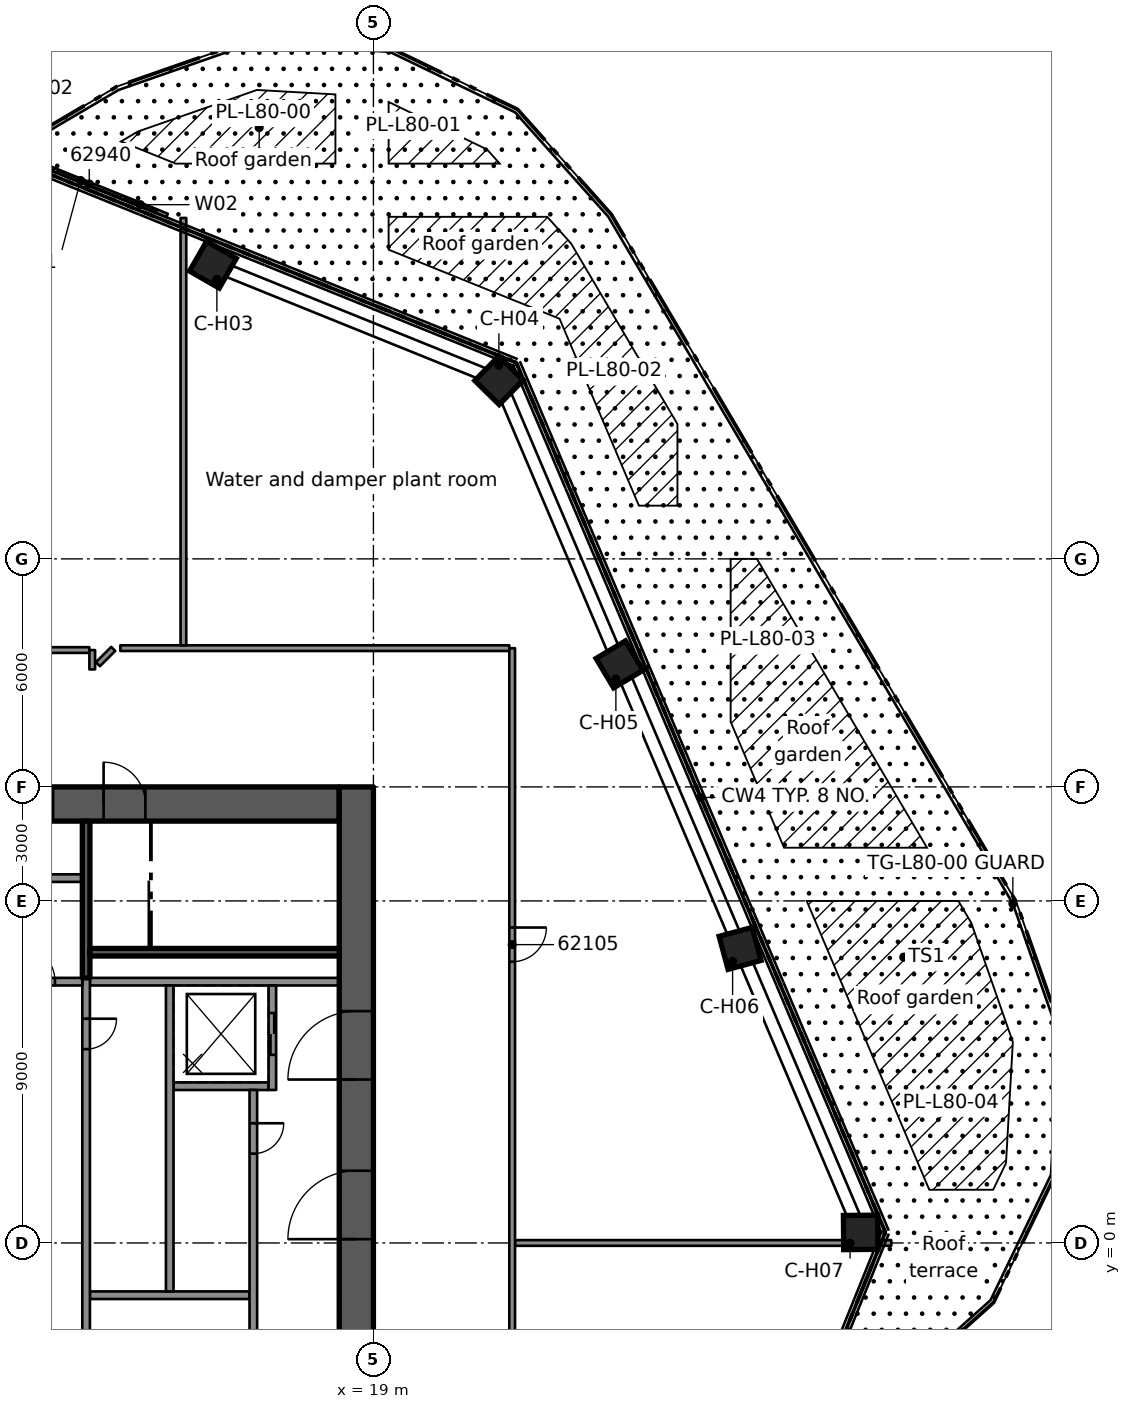
"""IFC4 building model, lengths in metres.
Left out: names, types, materials, properties, quantities, classifications, styles, units other than length and angle.
Written with IfcOpenShell. Run it as: python <this file> out.ifc"""

import sys

from ifc_helpers import new_model, si_unit, direction, frame, frame_2d, origin, origin_2d, place, context, subcontext, project, spatial, rectangle, extrude, element, fill, save


model = new_model("IFC4")
c1 = context("Model", 3, precision=1e-05, world=origin(), true_north=direction((0.0, 1.0)))
c2 = subcontext(c1, "Body", "Model", "MODEL_VIEW")
j1 = project(units=[si_unit("LENGTHUNIT", "METRE"), si_unit("PLANEANGLEUNIT", "RADIAN")], contexts=[c1])
p1 = place(None, origin())
s1 = spatial("IfcSite", under=j1, at=p1, CompositionType="ELEMENT")
p2 = place(p1, origin())
s2 = spatial("IfcBuilding", under=s1, at=p2, CompositionType="ELEMENT")
p3 = place(p2, frame((0.0, 0.0, 299.9)))
s3 = spatial("IfcBuildingStorey", under=s2, at=p3, CompositionType="ELEMENT", Elevation=299.9)
p4 = place(p3, frame((8.9, 11.55, 0.0), z_axis=(0.0, 0.0, 1.0), x_axis=(1.0, 0.0, 0.0)))
e1 = element("IfcWall", 1, at=p4, inside=s3, PredefinedType="SHEAR", context=c2, shape_type="SweptSolid", body=[
    extrude(rectangle(XDim=9.2, YDim=0.9, at=frame_2d((4.6, 0.0))), origin(), (0.0, 0.0, 1.0), 4.4),
])
p5 = place(p4, frame((3.0, 0.0, 0.0)))
e2 = element("IfcOpeningElement", 2, at=p5, cuts=e1, PredefinedType="OPENING", context=c2, shape_type="SweptSolid", body=[
    extrude(rectangle(XDim=1.1, YDim=2.1, at=frame_2d((0.55, 1.05))), frame((0.0, 0.46, 0.0), z_axis=(0.0, -1.0, 0.0), x_axis=(1.0, 0.0, 0.0)), (0.0, 0.0, 1.0), 0.92),
])
p6 = place(p4, frame((0.77, 0.0, 0.0)))
e3 = element("IfcOpeningElement", 3, at=p6, cuts=e1, PredefinedType="OPENING", context=c2, shape_type="SweptSolid", body=[
    extrude(rectangle(XDim=0.9, YDim=2.1, at=frame_2d((0.45, 1.05))), frame((0.0, 0.46, 0.0), z_axis=(0.0, -1.0, 0.0), x_axis=(1.0, 0.0, 0.0)), (0.0, 0.0, 1.0), 0.92),
])
p7 = place(p3, frame((18.55, -12.0, 0.0), z_axis=(0.0, 0.0, 1.0), x_axis=(0.0, 1.0, 0.0)))
e4 = element("IfcWall", 4, at=p7, inside=s3, PredefinedType="SHEAR", context=c2, shape_type="SweptSolid", body=[
    extrude(rectangle(XDim=24.0, YDim=0.9, at=frame_2d((12.0, 0.0))), origin(), (0.0, 0.0, 1.0), 4.4),
])
p8 = place(p7, frame((16.3, 0.0, 0.0)))
e5 = element("IfcOpeningElement", 5, at=p8, cuts=e4, PredefinedType="OPENING", context=c2, shape_type="SweptSolid", body=[
    extrude(rectangle(XDim=1.8, YDim=2.1, at=frame_2d((0.9, 1.05))), frame((0.0, 0.46, 0.0), z_axis=(0.0, -1.0, 0.0), x_axis=(1.0, 0.0, 0.0)), (0.0, 0.0, 1.0), 0.92),
])
p9 = place(p7, frame((12.1, 0.0, 0.0)))
e6 = element("IfcOpeningElement", 6, at=p9, cuts=e4, PredefinedType="OPENING", context=c2, shape_type="SweptSolid", body=[
    extrude(rectangle(XDim=1.8, YDim=2.1, at=frame_2d((0.9, 1.05))), frame((0.0, 0.46, 0.0), z_axis=(0.0, -1.0, 0.0), x_axis=(1.0, 0.0, 0.0)), (0.0, 0.0, 1.0), 0.92),
])
p10 = place(p7, frame((7.9, 0.0, 0.0)))
e7 = element("IfcOpeningElement", 7, at=p10, cuts=e4, PredefinedType="OPENING", context=c2, shape_type="SweptSolid", body=[
    extrude(rectangle(XDim=1.8, YDim=2.1, at=frame_2d((0.9, 1.05))), frame((0.0, 0.46, 0.0), z_axis=(0.0, -1.0, 0.0), x_axis=(1.0, 0.0, 0.0)), (0.0, 0.0, 1.0), 0.92),
])
for number, where, z_axis, x_axis in (
    (8, (14.777, 25.739, 0.0), (0.0, 0.0, 1.0), (0.498, 0.867, 0.0)),
    (9, (22.305, 22.697, 0.0), (0.0, 0.0, 1.0), (0.701, 0.713, 0.0)),
    (10, (25.477, 15.224, 0.0), (0.0, 0.0, 1.0), (0.858, 0.513, 0.0)),
    (11, (28.649, 7.751, 0.0), (0.0, 0.0, 1.0), (0.965, 0.261, 0.0)),
    (12, (31.821, 0.278, 0.0), (0.0, 0.0, 1.0), (1.0, 0.009, 0.0)),
):
    element("IfcColumn", number, at=place(p3, frame(where, z_axis=z_axis, x_axis=x_axis)), inside=s3, PredefinedType="COLUMN", context=c2, shape_type="SweptSolid", body=[
        extrude(rectangle(XDim=0.9, YDim=0.9, at=origin_2d()), origin(), (0.0, 0.0, 1.0), 4.4),
    ])
p11 = place(p3, frame((11.54, 6.875, 0.0), z_axis=(0.0, 0.0, 1.0), x_axis=(1.0, 0.0, 0.0)))
e13 = element("IfcWall", 13, at=p11, inside=s3, PredefinedType="SOLIDWALL", context=c2, shape_type="SweptSolid", body=[
    extrude(rectangle(XDim=6.56, YDim=0.2, at=frame_2d((3.28, 0.0))), origin(), (0.0, 0.0, 1.0), 3.98),
])
p12 = place(p3, frame((13.74, 4.125, 0.0), z_axis=(0.0, 0.0, 1.0), x_axis=(1.0, 0.0, 0.0)))
e14 = element("IfcWall", 14, at=p12, inside=s3, PredefinedType="SOLIDWALL", context=c2, shape_type="SweptSolid", body=[
    extrude(rectangle(XDim=2.5, YDim=0.2, at=frame_2d((1.25, 0.0))), origin(), (0.0, 0.0, 1.0), 3.98),
])
p13 = place(p3, frame((11.54, -1.375, 0.0), z_axis=(0.0, 0.0, 1.0), x_axis=(1.0, 0.0, 0.0)))
e15 = element("IfcWall", 15, at=p13, inside=s3, PredefinedType="SOLIDWALL", context=c2, shape_type="SweptSolid", body=[
    extrude(rectangle(XDim=4.2, YDim=0.2, at=frame_2d((2.1, 0.0))), origin(), (0.0, 0.0, 1.0), 3.98),
])
p14 = place(p3, frame((11.44, 6.975, 0.0), z_axis=(0.0, 0.0, 1.0), x_axis=(0.0, -1.0, 0.0)))
e16 = element("IfcWall", 16, at=p14, inside=s3, PredefinedType="SOLIDWALL", context=c2, shape_type="SweptSolid", body=[
    extrude(rectangle(XDim=13.95, YDim=0.2, at=frame_2d((6.975, 0.0))), origin(), (0.0, 0.0, 1.0), 3.98),
])
p15 = place(p14, frame((11.925, 0.0, 0.0)))
e17 = element("IfcOpeningElement", 17, at=p15, cuts=e16, PredefinedType="OPENING", context=c2, shape_type="SweptSolid", body=[
    extrude(rectangle(XDim=1.1, YDim=2.1, at=frame_2d((0.55, 1.05))), frame((0.0, 0.11, 0.0), z_axis=(0.0, -1.0, 0.0), x_axis=(1.0, 0.0, 0.0)), (0.0, 0.0, 1.0), 0.22),
])
p16 = place(p14, frame((1.075, 0.0, 0.0)))
e18 = element("IfcOpeningElement", 18, at=p16, cuts=e16, PredefinedType="OPENING", context=c2, shape_type="SweptSolid", body=[
    extrude(rectangle(XDim=0.8, YDim=2.1, at=frame_2d((0.4, 1.05))), frame((0.0, 0.11, 0.0), z_axis=(0.0, -1.0, 0.0), x_axis=(1.0, 0.0, 0.0)), (0.0, 0.0, 1.0), 0.22),
])
p17 = place(p14, frame((9.325, 0.0, 0.0)))
e19 = element("IfcOpeningElement", 19, at=p17, cuts=e16, PredefinedType="OPENING", context=c2, shape_type="SweptSolid", body=[
    extrude(rectangle(XDim=0.8, YDim=2.1, at=frame_2d((0.4, 1.05))), frame((0.0, 0.11, 0.0), z_axis=(0.0, -1.0, 0.0), x_axis=(1.0, 0.0, 0.0)), (0.0, 0.0, 1.0), 0.22),
])
p18 = place(p3, frame((13.64, 6.775, 0.0), z_axis=(0.0, 0.0, 1.0), x_axis=(0.0, -1.0, 0.0)))
e20 = element("IfcWall", 20, at=p18, inside=s3, PredefinedType="SOLIDWALL", context=c2, shape_type="SweptSolid", body=[
    extrude(rectangle(XDim=8.05, YDim=0.2, at=frame_2d((4.025, 0.0))), origin(), (0.0, 0.0, 1.0), 3.98),
])
p19 = place(p3, frame((16.34, 6.775, 0.0), z_axis=(0.0, 0.0, 1.0), x_axis=(0.0, -1.0, 0.0)))
e21 = element("IfcWall", 21, at=p19, inside=s3, PredefinedType="SOLIDWALL", context=c2, shape_type="SweptSolid", body=[
    extrude(rectangle(XDim=2.75, YDim=0.2, at=frame_2d((1.375, 0.0))), origin(), (0.0, 0.0, 1.0), 3.98),
])
p20 = place(p19, frame((0.725, 0.0, 0.0)))
e22 = element("IfcOpeningElement", 22, at=p20, cuts=e21, PredefinedType="OPENING", context=c2, shape_type="SweptSolid", body=[
    extrude(rectangle(XDim=1.1, YDim=2.1, at=frame_2d((0.55, 1.05))), frame((0.0, 0.11, 0.0), z_axis=(0.0, -1.0, 0.0), x_axis=(1.0, 0.0, 0.0)), (0.0, 0.0, 1.0), 0.22),
])
p21 = place(p3, frame((15.84, 4.025, 0.0), z_axis=(0.0, 0.0, 1.0), x_axis=(0.0, -1.0, 0.0)))
e23 = element("IfcWall", 23, at=p21, inside=s3, PredefinedType="SOLIDWALL", context=c2, shape_type="SweptSolid", body=[
    extrude(rectangle(XDim=8.25, YDim=0.2, at=frame_2d((4.125, 0.0))), origin(), (0.0, 0.0, 1.0), 3.98),
])
p22 = place(p21, frame((0.875, 0.0, 0.0)))
e24 = element("IfcOpeningElement", 24, at=p22, cuts=e23, PredefinedType="OPENING", context=c2, shape_type="SweptSolid", body=[
    extrude(rectangle(XDim=0.8, YDim=2.1, at=frame_2d((0.4, 1.05))), frame((0.0, 0.11, 0.0), z_axis=(0.0, -1.0, 0.0), x_axis=(1.0, 0.0, 0.0)), (0.0, 0.0, 1.0), 0.22),
])
p23 = place(p3, frame((11.44, 11.1, 0.0), z_axis=(0.0, 0.0, 1.0), x_axis=(0.0, -1.0, 0.0)))
e25 = element("IfcWall", 25, at=p23, inside=s3, PredefinedType="SOLIDWALL", context=c2, shape_type="SweptSolid", body=[
    extrude(rectangle(XDim=4.125, YDim=0.2, at=frame_2d((2.062, 0.0))), origin(), (0.0, 0.0, 1.0), 3.98),
])
p24 = place(p3, frame((11.54, 7.65, 0.0), z_axis=(0.0, 0.0, 1.0), x_axis=(1.0, 0.0, 0.0)))
e26 = element("IfcWall", 26, at=p24, inside=s3, PredefinedType="SOLIDWALL", context=c2, shape_type="SweptSolid", body=[
    extrude(rectangle(XDim=6.56, YDim=0.2, at=frame_2d((3.28, 0.0))), origin(), (0.0, 0.0, 1.0), 3.98),
])
p25 = place(p3, frame((8.9, 6.875, 0.0), z_axis=(0.0, 0.0, 1.0), x_axis=(1.0, 0.0, 0.0)))
e27 = element("IfcWall", 27, at=p25, inside=s3, PredefinedType="PARTITIONING", context=c2, shape_type="SweptSolid", body=[
    extrude(rectangle(XDim=2.44, YDim=0.2, at=frame_2d((1.22, 0.0))), origin(), (0.0, 0.0, 1.0), 3.98),
])
p26 = place(p25, frame((0.72, 0.0, 0.0)))
e28 = element("IfcOpeningElement", 28, at=p26, cuts=e27, PredefinedType="OPENING", context=c2, shape_type="SweptSolid", body=[
    extrude(rectangle(XDim=1.0, YDim=2.1, at=frame_2d((0.5, 1.05))), frame((0.0, 0.11, 0.0), z_axis=(0.0, -1.0, 0.0), x_axis=(1.0, 0.0, 0.0)), (0.0, 0.0, 1.0), 0.22),
])
p27 = place(p3, frame((8.9, 9.6, 0.0), z_axis=(0.0, 0.0, 1.0), x_axis=(1.0, 0.0, 0.0)))
e29 = element("IfcWall", 29, at=p27, inside=s3, PredefinedType="PARTITIONING", context=c2, shape_type="SweptSolid", body=[
    extrude(rectangle(XDim=2.44, YDim=0.2, at=frame_2d((1.22, 0.0))), origin(), (0.0, 0.0, 1.0), 3.98),
])
p28 = place(p3, frame((9.018, 28.875, 0.0), z_axis=(0.0, 0.0, 1.0), x_axis=(0.927195684574, -0.37457731179, 0.0)))
e30 = element("IfcWall", 30, at=p28, inside=s3, PredefinedType="STANDARD", context=c2, shape_type="SweptSolid", body=[
    extrude(rectangle(XDim=4.91, YDim=0.1, at=frame_2d((2.455, 0.0))), origin(), (0.0, 0.0, 1.0), 4.4),
])
p29 = place(p28, frame((1.801, 0.0, 0.0)))
e31 = element("IfcOpeningElement", 31, at=p29, cuts=e30, PredefinedType="OPENING", context=c2, shape_type="SweptSolid", body=[
    extrude(rectangle(XDim=1.8, YDim=2.4, at=frame_2d((0.9, 1.2))), frame((0.0, 0.06, 0.0), z_axis=(0.0, -1.0, 0.0), x_axis=(1.0, 0.0, 0.0)), (0.0, 0.0, 1.0), 0.12),
])
p30 = place(p28, frame((0.801, 0.0, 0.0)))
e32 = element("IfcOpeningElement", 32, at=p30, cuts=e30, PredefinedType="OPENING", context=c2, shape_type="SweptSolid", body=[
    extrude(rectangle(XDim=0.9, YDim=2.4, at=frame_2d((0.45, 1.2))), frame((0.0, 0.06, 0.0), z_axis=(0.0, -1.0, 0.0), x_axis=(1.0, 0.0, 0.0)), (0.0, 0.0, 1.0), 0.12),
])
p31 = place(p28, frame((3.701, 0.0, 0.0)))
e33 = element("IfcOpeningElement", 33, at=p31, cuts=e30, PredefinedType="OPENING", context=c2, shape_type="SweptSolid", body=[
    extrude(rectangle(XDim=0.9, YDim=2.4, at=frame_2d((0.45, 1.2))), frame((0.0, 0.06, 0.0), z_axis=(0.0, -1.0, 0.0), x_axis=(1.0, 0.0, 0.0)), (0.0, 0.0, 1.0), 0.12),
])
p32 = place(p3, frame((22.726, 0.0, 0.0), z_axis=(0.0, 0.0, 1.0), x_axis=(1.0, 0.0, 0.0)))
e34 = element("IfcWall", 34, at=p32, inside=s3, PredefinedType="PARTITIONING", context=c2, shape_type="SweptSolid", body=[
    extrude(rectangle(XDim=9.901, YDim=0.15, at=frame_2d((4.95, 0.0))), origin(), (0.0, 0.0, 1.0), 3.98),
])
p33 = place(p3, frame((4.425, 15.601, 0.0), z_axis=(0.0, 0.0, 1.0), x_axis=(1.0, 0.0, 0.0)))
e35 = element("IfcWall", 35, at=p33, inside=s3, PredefinedType="PARTITIONING", context=c2, shape_type="SweptSolid", body=[
    extrude(rectangle(XDim=7.1, YDim=0.15, at=frame_2d((3.55, 0.0))), origin(), (0.0, 0.0, 1.0), 3.98),
])
p34 = place(p33, frame((3.025, 0.0, 0.0)))
e36 = element("IfcOpeningElement", 36, at=p34, cuts=e35, PredefinedType="OPENING", context=c2, shape_type="SweptSolid", body=[
    extrude(rectangle(XDim=0.9, YDim=2.1, at=frame_2d((0.45, 1.05))), frame((0.0, 0.085, 0.0), z_axis=(0.0, -1.0, 0.0), x_axis=(1.0, 0.0, 0.0)), (0.0, 0.0, 1.0), 0.17),
])
p35 = place(p3, frame((12.341, 15.651, 0.0), z_axis=(0.0, 0.0, 1.0), x_axis=(1.0, 0.0, 0.0)))
e37 = element("IfcWall", 37, at=p35, inside=s3, PredefinedType="PARTITIONING", context=c2, shape_type="SweptSolid", body=[
    extrude(rectangle(XDim=10.234, YDim=0.15, at=frame_2d((5.117, 0.0))), origin(), (0.0, 0.0, 1.0), 3.98),
])
p36 = place(p3, frame((11.75, 15.228, 0.0), z_axis=(0.0, 0.0, 1.0), x_axis=(0.707106781187, 0.707106781187, 0.0)))
e38 = element("IfcWall", 38, at=p36, inside=s3, PredefinedType="PARTITIONING", context=c2, shape_type="SweptSolid", body=[
    extrude(rectangle(XDim=0.57, YDim=0.15, at=frame_2d((0.285, 0.0))), origin(), (0.0, 0.0, 1.0), 3.98),
])
p37 = place(p3, frame((22.651, 15.65, 0.0), z_axis=(0.0, 0.0, 1.0), x_axis=(0.0, -1.0, 0.0)))
e39 = element("IfcWall", 39, at=p37, inside=s3, PredefinedType="PARTITIONING", context=c2, shape_type="SweptSolid", body=[
    extrude(rectangle(XDim=31.3, YDim=0.15, at=frame_2d((15.65, 0.0))), origin(), (0.0, 0.0, 1.0), 3.98),
])
p38 = place(p37, frame((23.0, 0.0, 0.0)))
e40 = element("IfcOpeningElement", 40, at=p38, cuts=e39, PredefinedType="OPENING", context=c2, shape_type="SweptSolid", body=[
    extrude(rectangle(XDim=0.9, YDim=2.1, at=frame_2d((0.45, 1.05))), frame((0.0, 0.085, 0.0), z_axis=(0.0, -1.0, 0.0), x_axis=(1.0, 0.0, 0.0)), (0.0, 0.0, 1.0), 0.17),
])
p39 = place(p37, frame((7.35, 0.0, 0.0)))
e41 = element("IfcOpeningElement", 41, at=p39, cuts=e39, PredefinedType="OPENING", context=c2, shape_type="SweptSolid", body=[
    extrude(rectangle(XDim=0.9, YDim=2.1, at=frame_2d((0.45, 1.05))), frame((0.0, 0.085, 0.0), z_axis=(0.0, -1.0, 0.0), x_axis=(1.0, 0.0, 0.0)), (0.0, 0.0, 1.0), 0.17),
])
p40 = place(p3, frame((14.0, 15.726, 0.0), z_axis=(0.0, 0.0, 1.0), x_axis=(0.0, 1.0, 0.0)))
e42 = element("IfcWall", 42, at=p40, inside=s3, PredefinedType="PARTITIONING", context=c2, shape_type="SweptSolid", body=[
    extrude(rectangle(XDim=11.244, YDim=0.15, at=frame_2d((5.622, 0.0))), origin(), (0.0, 0.0, 1.0), 3.98),
])
p41 = place(p3, frame((11.601, 15.092, 0.0), z_axis=(0.0, 0.0, 1.0), x_axis=(0.0, 1.0, 0.0)))
e43 = element("IfcWall", 43, at=p41, inside=s3, PredefinedType="PARTITIONING", context=c2, shape_type="SweptSolid", body=[
    extrude(rectangle(XDim=0.508, YDim=0.15, at=frame_2d((0.254, 0.0))), origin(), (0.0, 0.0, 1.0), 3.98),
])
p42 = place(p20, origin())
e44 = element("IfcDoor", 44, at=p42, inside=s3, OperationType="DOUBLE_DOOR_SLIDING", PredefinedType="DOOR", context=c2, shape_type="SweptSolid", body=[
    extrude(rectangle(XDim=1.1, YDim=2.1, at=frame_2d((0.55, 1.05))), frame((0.0, 0.025, 0.0), z_axis=(0.0, -1.0, 0.0), x_axis=(1.0, 0.0, 0.0)), (0.0, 0.0, 1.0), 0.05),
])
fill(e22, e44)
p43 = place(p16, origin())
e45 = element("IfcDoor", 45, at=p43, inside=s3, OperationType="SINGLE_SWING_LEFT", PredefinedType="DOOR", context=c2, shape_type="SweptSolid", body=[
    extrude(rectangle(XDim=0.8, YDim=2.1, at=frame_2d((0.4, 1.05))), frame((0.0, 0.025, 0.0), z_axis=(0.0, -1.0, 0.0), x_axis=(1.0, 0.0, 0.0)), (0.0, 0.0, 1.0), 0.05),
])
fill(e18, e45)
p44 = place(p22, origin())
e46 = element("IfcDoor", 46, at=p44, inside=s3, OperationType="SINGLE_SWING_LEFT", PredefinedType="DOOR", context=c2, shape_type="SweptSolid", body=[
    extrude(rectangle(XDim=0.8, YDim=2.1, at=frame_2d((0.4, 1.05))), frame((0.0, 0.025, 0.0), z_axis=(0.0, -1.0, 0.0), x_axis=(1.0, 0.0, 0.0)), (0.0, 0.0, 1.0), 0.05),
])
fill(e24, e46)
p45 = place(p8, origin())
e47 = element("IfcDoor", 47, at=p45, inside=s3, OperationType="SINGLE_SWING_RIGHT", PredefinedType="DOOR", context=c2, shape_type="SweptSolid", body=[
    extrude(rectangle(XDim=1.8, YDim=2.1, at=frame_2d((0.9, 1.05))), frame((0.0, 0.025, 0.0), z_axis=(0.0, -1.0, 0.0), x_axis=(1.0, 0.0, 0.0)), (0.0, 0.0, 1.0), 0.05),
])
fill(e5, e47)
p46 = place(p9, origin())
e48 = element("IfcDoor", 48, at=p46, inside=s3, OperationType="SINGLE_SWING_RIGHT", PredefinedType="DOOR", context=c2, shape_type="SweptSolid", body=[
    extrude(rectangle(XDim=1.8, YDim=2.1, at=frame_2d((0.9, 1.05))), frame((0.0, 0.025, 0.0), z_axis=(0.0, -1.0, 0.0), x_axis=(1.0, 0.0, 0.0)), (0.0, 0.0, 1.0), 0.05),
])
fill(e6, e48)
p47 = place(p5, origin())
e49 = element("IfcDoor", 49, at=p47, inside=s3, OperationType="SINGLE_SWING_LEFT", PredefinedType="DOOR", context=c2, shape_type="SweptSolid", body=[
    extrude(rectangle(XDim=1.1, YDim=2.1, at=frame_2d((0.55, 1.05))), frame((0.0, 0.025, 0.0), z_axis=(0.0, -1.0, 0.0), x_axis=(1.0, 0.0, 0.0)), (0.0, 0.0, 1.0), 0.05),
])
fill(e2, e49)
p48 = place(p6, origin())
e50 = element("IfcDoor", 50, at=p48, inside=s3, OperationType="SINGLE_SWING_LEFT", PredefinedType="DOOR", context=c2, shape_type="SweptSolid", body=[
    extrude(rectangle(XDim=0.9, YDim=2.1, at=frame_2d((0.45, 1.05))), frame((0.0, 0.025, 0.0), z_axis=(0.0, -1.0, 0.0), x_axis=(1.0, 0.0, 0.0)), (0.0, 0.0, 1.0), 0.05),
])
fill(e3, e50)
p49 = place(p26, origin())
e51 = element("IfcDoor", 51, at=p49, inside=s3, OperationType="SINGLE_SWING_RIGHT", PredefinedType="DOOR", context=c2, shape_type="SweptSolid", body=[
    extrude(rectangle(XDim=1.0, YDim=2.1, at=frame_2d((0.5, 1.05))), frame((0.0, 0.025, 0.0), z_axis=(0.0, -1.0, 0.0), x_axis=(1.0, 0.0, 0.0)), (0.0, 0.0, 1.0), 0.05),
])
fill(e28, e51)
p50 = place(p29, origin())
e52 = element("IfcDoor", 52, at=p50, inside=s3, OperationType="DOUBLE_DOOR_SLIDING", PredefinedType="DOOR", context=c2, shape_type="SweptSolid", body=[
    extrude(rectangle(XDim=1.8, YDim=2.4, at=frame_2d((0.9, 1.2))), frame((0.0, 0.025, 0.0), z_axis=(0.0, -1.0, 0.0), x_axis=(1.0, 0.0, 0.0)), (0.0, 0.0, 1.0), 0.05),
])
fill(e31, e52)
p51 = place(p30, origin())
e53 = element("IfcWindow", 53, at=p51, inside=s3, PartitioningType="SINGLE_PANEL", PredefinedType="WINDOW", context=c2, shape_type="SweptSolid", body=[
    extrude(rectangle(XDim=0.9, YDim=2.4, at=frame_2d((0.45, 1.2))), frame((0.0, 0.03, 0.0), z_axis=(0.0, -1.0, 0.0), x_axis=(1.0, 0.0, 0.0)), (0.0, 0.0, 1.0), 0.06),
])
fill(e32, e53)
p52 = place(p31, origin())
e54 = element("IfcWindow", 54, at=p52, inside=s3, PartitioningType="SINGLE_PANEL", PredefinedType="WINDOW", context=c2, shape_type="SweptSolid", body=[
    extrude(rectangle(XDim=0.9, YDim=2.4, at=frame_2d((0.45, 1.2))), frame((0.0, 0.03, 0.0), z_axis=(0.0, -1.0, 0.0), x_axis=(1.0, 0.0, 0.0)), (0.0, 0.0, 1.0), 0.06),
])
fill(e33, e54)
p53 = place(p39, origin())
e55 = element("IfcDoor", 55, at=p53, inside=s3, OperationType="SINGLE_SWING_LEFT", PredefinedType="DOOR", context=c2, shape_type="SweptSolid", body=[
    extrude(rectangle(XDim=0.9, YDim=2.1, at=frame_2d((0.45, 1.05))), frame((0.0, 0.025, 0.0), z_axis=(0.0, -1.0, 0.0), x_axis=(1.0, 0.0, 0.0)), (0.0, 0.0, 1.0), 0.05),
])
fill(e41, e55)
save(model, sys.argv[1])
